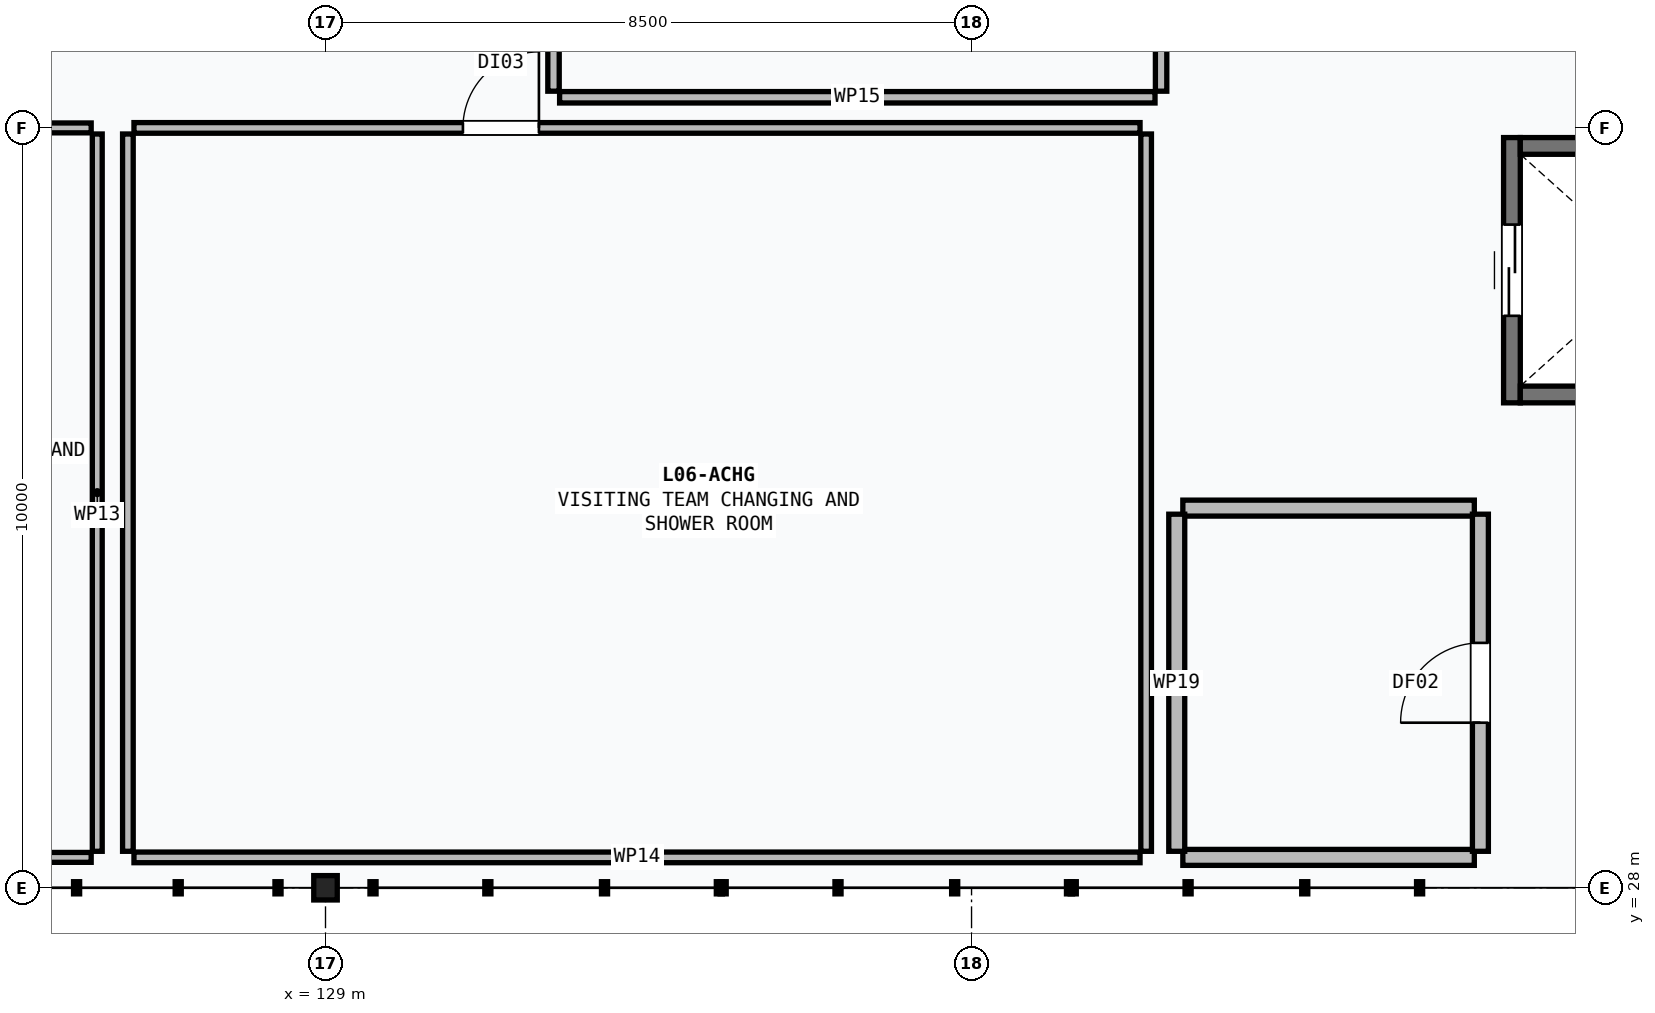
"""IFC4 building model, lengths in metres.
Left out: names, types, materials, properties, quantities, classifications, styles, units other than length and angle.
Written with IfcOpenShell. Run it as: python <this file> out.ifc"""

import sys

from ifc_helpers import new_model, si_unit, direction, frame, frame_2d, origin, origin_2d, place, context, subcontext, project, spatial, rectangle, i_section, extrude, element, fill, save


model = new_model("IFC4")
c1 = context("Model", 3, precision=1e-05, world=origin(), true_north=direction((0.0, 1.0)))
c2 = subcontext(c1, "Body", "Model", "MODEL_VIEW")
j1 = project(units=[si_unit("LENGTHUNIT", "METRE"), si_unit("PLANEANGLEUNIT", "RADIAN")], contexts=[c1])
p1 = place(None, origin())
s1 = spatial("IfcSite", under=j1, at=p1, CompositionType="ELEMENT")
p2 = place(p1, origin())
s2 = spatial("IfcBuilding", under=s1, at=p2, CompositionType="ELEMENT")
p3 = place(p2, frame((0.0, 0.0, 22.8)))
s3 = spatial("IfcBuildingStorey", under=s2, at=p3, CompositionType="ELEMENT", Elevation=22.8)
p4 = place(p3, frame((129.0, 28.0, 0.0), z_axis=(0.0, 0.0, 1.0), x_axis=(1.0, 0.0, 0.0)))
e1 = element("IfcColumn", 1, at=p4, inside=s3, PredefinedType="COLUMN", context=c2, shape_type="SweptSolid", body=[
    extrude(i_section(OverallWidth=0.309, OverallDepth=0.321, WebThickness=0.014, FlangeThickness=0.022, FilletRadius=0.015, at=origin_2d()), origin(), (0.0, 0.0, 1.0), 4.2),
])
p5 = place(p3, frame((144.61, 34.38, 0.0), z_axis=(0.0, 0.0, 1.0), x_axis=(0.0, 1.0, 0.0)))
e2 = element("IfcWall", 2, at=p5, inside=s3, PredefinedType="SHEAR", context=c2, shape_type="SweptSolid", body=[
    extrude(rectangle(XDim=3.49, YDim=0.22, at=frame_2d((1.745, 0.0))), origin(), (0.0, 0.0, 1.0), 4.2),
])
p6 = place(p5, frame((1.145, 0.0, 0.0)))
e3 = element("IfcOpeningElement", 3, at=p6, cuts=e2, PredefinedType="OPENING", context=c2, shape_type="SweptSolid", body=[
    extrude(rectangle(XDim=1.2, YDim=2.2, at=frame_2d((0.6, 1.1))), frame((0.0, 0.12, 0.0), z_axis=(0.0, -1.0, 0.0), x_axis=(1.0, 0.0, 0.0)), (0.0, 0.0, 1.0), 0.24),
])
for number, where, z_axis, x_axis in (
    (4, (148.12, 34.49, 0.0), (0.0, 0.0, 1.0), (-1.0, 0.0, 0.0)),
    (5, (144.72, 37.76, 0.0), (0.0, 0.0, 1.0), (1.0, 0.0, 0.0)),
):
    element("IfcWall", number, at=place(p3, frame(where, z_axis=z_axis, x_axis=x_axis)), inside=s3, PredefinedType="SHEAR", context=c2, shape_type="SweptSolid", body=[
        extrude(rectangle(XDim=3.4, YDim=0.22, at=frame_2d((1.7, 0.0))), origin(), (0.0, 0.0, 1.0), 4.2),
    ])
p7 = place(p3, frame((112.48, 28.4, 0.0), z_axis=(0.0, 0.0, 1.0), x_axis=(1.0, 0.0, 0.0)))
e6 = element("IfcWall", 6, at=p7, inside=s3, PredefinedType="PARTITIONING", context=c2, shape_type="SweptSolid", body=[
    extrude(rectangle(XDim=13.437, YDim=0.13, at=frame_2d((6.719, 0.0))), origin(), (0.0, 0.0, 1.0), 3.945),
])
p8 = place(p3, frame((112.48, 37.997, 0.0), z_axis=(0.0, 0.0, 1.0), x_axis=(1.0, 0.0, 0.0)))
e7 = element("IfcWall", 7, at=p8, inside=s3, PredefinedType="PARTITIONING", context=c2, shape_type="SweptSolid", body=[
    extrude(rectangle(XDim=13.437, YDim=0.13, at=frame_2d((6.719, 0.0))), origin(), (0.0, 0.0, 1.0), 3.945),
])
p9 = place(p8, frame((8.072, 0.0, 0.0)))
e8 = element("IfcOpeningElement", 8, at=p9, cuts=e7, PredefinedType="OPENING", context=c2, shape_type="SweptSolid", body=[
    extrude(rectangle(XDim=0.95, YDim=2.1, at=frame_2d((0.475, 1.05))), frame((0.0, 0.075, 0.0), z_axis=(0.0, -1.0, 0.0), x_axis=(1.0, 0.0, 0.0)), (0.0, 0.0, 1.0), 0.15),
])
p10 = place(p3, frame((125.997, 28.48, 0.0), z_axis=(0.0, 0.0, 1.0), x_axis=(0.0, 1.0, 0.0)))
e9 = element("IfcWall", 9, at=p10, inside=s3, PredefinedType="PARTITIONING", context=c2, shape_type="SweptSolid", body=[
    extrude(rectangle(XDim=9.437, YDim=0.13, at=frame_2d((4.719, 0.0))), origin(), (0.0, 0.0, 1.0), 3.945),
])
p11 = place(p3, frame((126.48, 28.4, 0.0), z_axis=(0.0, 0.0, 1.0), x_axis=(1.0, 0.0, 0.0)))
e10 = element("IfcWall", 10, at=p11, inside=s3, PredefinedType="PARTITIONING", context=c2, shape_type="SweptSolid", body=[
    extrude(rectangle(XDim=13.237, YDim=0.14, at=frame_2d((6.619, 0.0))), origin(), (0.0, 0.0, 1.0), 3.115),
])
p12 = place(p3, frame((126.48, 37.997, 0.0), z_axis=(0.0, 0.0, 1.0), x_axis=(1.0, 0.0, 0.0)))
e11 = element("IfcWall", 11, at=p12, inside=s3, PredefinedType="PARTITIONING", context=c2, shape_type="SweptSolid", body=[
    extrude(rectangle(XDim=13.237, YDim=0.14, at=frame_2d((6.619, 0.0))), origin(), (0.0, 0.0, 1.0), 3.115),
])
p13 = place(p12, frame((4.328, 0.0, 0.0)))
e12 = element("IfcOpeningElement", 12, at=p13, cuts=e11, PredefinedType="OPENING", context=c2, shape_type="SweptSolid", body=[
    extrude(rectangle(XDim=1.0, YDim=2.1, at=frame_2d((0.5, 1.05))), frame((0.0, 0.08, 0.0), z_axis=(0.0, -1.0, 0.0), x_axis=(1.0, 0.0, 0.0)), (0.0, 0.0, 1.0), 0.16),
])
for number, where, z_axis, x_axis in (
    (13, (126.4, 28.48, 0.0), (0.0, 0.0, 1.0), (0.0, 1.0, 0.0)),
    (14, (139.797, 28.48, 0.0), (0.0, 0.0, 1.0), (0.0, 1.0, 0.0)),
):
    element("IfcWall", number, at=place(p3, frame(where, z_axis=z_axis, x_axis=x_axis)), inside=s3, PredefinedType="PARTITIONING", context=c2, shape_type="SweptSolid", body=[
        extrude(rectangle(XDim=9.437, YDim=0.14, at=frame_2d((4.719, 0.0))), origin(), (0.0, 0.0, 1.0), 3.945),
    ])
p14 = place(p3, frame((132.08, 38.4, 0.0), z_axis=(0.0, 0.0, 1.0), x_axis=(1.0, 0.0, 0.0)))
e15 = element("IfcWall", 15, at=p14, inside=s3, PredefinedType="PARTITIONING", context=c2, shape_type="SweptSolid", body=[
    extrude(rectangle(XDim=7.834, YDim=0.15, at=frame_2d((3.917, 0.0))), origin(), (0.0, 0.0, 1.0), 3.945),
])
p15 = place(p3, frame((132.0, 38.48, 0.0), z_axis=(0.0, 0.0, 1.0), x_axis=(0.0, 1.0, 0.0)))
e16 = element("IfcWall", 16, at=p15, inside=s3, PredefinedType="PARTITIONING", context=c2, shape_type="SweptSolid", body=[
    extrude(rectangle(XDim=8.234, YDim=0.15, at=frame_2d((4.117, 0.0))), origin(), (0.0, 0.0, 1.0), 3.495),
])
p16 = place(p15, frame((3.592, 0.0, 0.0)))
e17 = element("IfcOpeningElement", 17, at=p16, cuts=e16, PredefinedType="OPENING", context=c2, shape_type="SweptSolid", body=[
    extrude(rectangle(XDim=1.05, YDim=2.1, at=frame_2d((0.525, 1.05))), frame((0.0, 0.085, 0.0), z_axis=(0.0, -1.0, 0.0), x_axis=(1.0, 0.0, 0.0)), (0.0, 0.0, 1.0), 0.17),
])
p17 = place(p3, frame((139.994, 38.48, 0.0), z_axis=(0.0, 0.0, 1.0), x_axis=(0.0, 1.0, 0.0)))
e18 = element("IfcWall", 18, at=p17, inside=s3, PredefinedType="PARTITIONING", context=c2, shape_type="SweptSolid", body=[
    extrude(rectangle(XDim=8.234, YDim=0.15, at=frame_2d((4.117, 0.0))), origin(), (0.0, 0.0, 1.0), 3.495),
])
for number, where, z_axis, x_axis in (
    (19, (140.28, 28.4, 0.0), (0.0, 0.0, 1.0), (1.0, 0.0, 0.0)),
    (20, (140.28, 32.995, 0.0), (0.0, 0.0, 1.0), (1.0, 0.0, 0.0)),
):
    element("IfcWall", number, at=place(p3, frame(where, z_axis=z_axis, x_axis=x_axis)), inside=s3, PredefinedType="PARTITIONING", context=c2, shape_type="SweptSolid", body=[
        extrude(rectangle(XDim=3.835, YDim=0.21, at=frame_2d((1.917, 0.0))), origin(), (0.0, 0.0, 1.0), 3.945),
    ])
p18 = place(p3, frame((140.2, 28.48, 0.0), z_axis=(0.0, 0.0, 1.0), x_axis=(0.0, 1.0, 0.0)))
e21 = element("IfcWall", 21, at=p18, inside=s3, PredefinedType="PARTITIONING", context=c2, shape_type="SweptSolid", body=[
    extrude(rectangle(XDim=4.435, YDim=0.21, at=frame_2d((2.218, 0.0))), origin(), (0.0, 0.0, 1.0), 3.945),
])
p19 = place(p3, frame((144.195, 28.48, 0.0), z_axis=(0.0, 0.0, 1.0), x_axis=(0.0, 1.0, 0.0)))
e22 = element("IfcWall", 22, at=p19, inside=s3, PredefinedType="PARTITIONING", context=c2, shape_type="SweptSolid", body=[
    extrude(rectangle(XDim=4.435, YDim=0.21, at=frame_2d((2.218, 0.0))), origin(), (0.0, 0.0, 1.0), 3.945),
])
p20 = place(p19, frame((1.692, 0.0, 0.0)))
e23 = element("IfcOpeningElement", 23, at=p20, cuts=e22, PredefinedType="OPENING", context=c2, shape_type="SweptSolid", body=[
    extrude(rectangle(XDim=1.05, YDim=2.15, at=frame_2d((0.525, 1.075))), frame((0.0, 0.115, 0.0), z_axis=(0.0, -1.0, 0.0), x_axis=(1.0, 0.0, 0.0)), (0.0, 0.0, 1.0), 0.23),
])
p21 = place(p6, origin())
e24 = element("IfcDoor", 24, at=p21, inside=s3, OperationType="DOUBLE_DOOR_SLIDING", PredefinedType="DOOR", context=c2, shape_type="SweptSolid", body=[
    extrude(rectangle(XDim=1.2, YDim=2.2, at=frame_2d((0.6, 1.1))), frame((0.0, 0.025, 0.0), z_axis=(0.0, -1.0, 0.0), x_axis=(1.0, 0.0, 0.0)), (0.0, 0.0, 1.0), 0.05),
])
fill(e3, e24)
p22 = place(p13, origin())
e25 = element("IfcDoor", 25, at=p22, inside=s3, OperationType="SINGLE_SWING_RIGHT", PredefinedType="DOOR", context=c2, shape_type="SweptSolid", body=[
    extrude(rectangle(XDim=1.0, YDim=2.1, at=frame_2d((0.5, 1.05))), frame((0.0, 0.025, 0.0), z_axis=(0.0, -1.0, 0.0), x_axis=(1.0, 0.0, 0.0)), (0.0, 0.0, 1.0), 0.05),
])
fill(e12, e25)
p23 = place(p20, origin())
e26 = element("IfcDoor", 26, at=p23, inside=s3, OperationType="SINGLE_SWING_LEFT", PredefinedType="DOOR", context=c2, shape_type="SweptSolid", body=[
    extrude(rectangle(XDim=1.05, YDim=2.15, at=frame_2d((0.525, 1.075))), frame((0.0, 0.025, 0.0), z_axis=(0.0, -1.0, 0.0), x_axis=(1.0, 0.0, 0.0)), (0.0, 0.0, 1.0), 0.05),
])
fill(e23, e26)
save(model, sys.argv[1])
